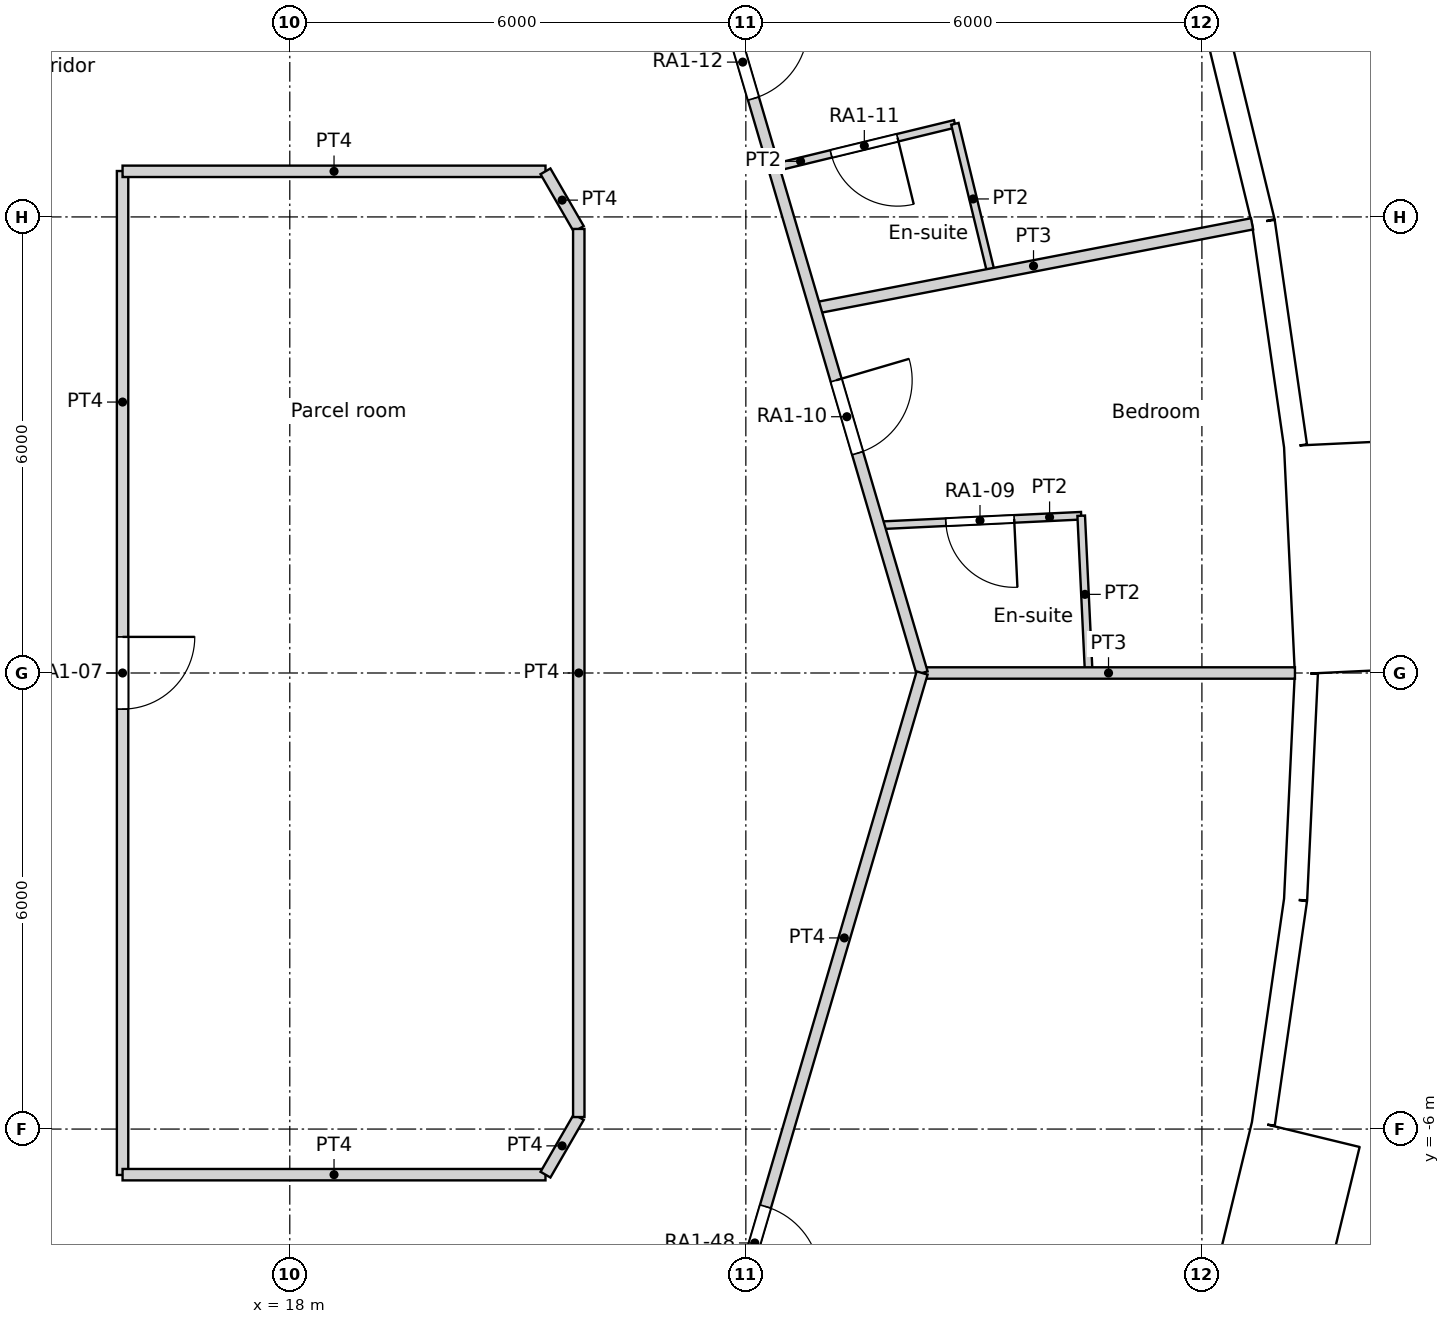
"""IFC4 building model, lengths in metres.
Left out: names, types, materials, properties, quantities, classifications, styles, units other than length and angle.
Written with IfcOpenShell. Run it as: python <this file> out.ifc"""

import sys

from ifc_helpers import new_model, si_unit, direction, frame, frame_2d, origin, origin_2d, place, context, subcontext, project, spatial, rectangle, circle, extrude, element, fill, save


model = new_model("IFC4")
c1 = context("Model", 3, precision=1e-05, world=origin(), true_north=direction((0.0, 1.0)))
c2 = subcontext(c1, "Body", "Model", "MODEL_VIEW")
j1 = project(units=[si_unit("LENGTHUNIT", "METRE"), si_unit("PLANEANGLEUNIT", "RADIAN")], contexts=[c1])
p1 = place(None, origin())
s1 = spatial("IfcSite", under=j1, at=p1, CompositionType="ELEMENT")
p2 = place(p1, origin())
s2 = spatial("IfcBuilding", under=s1, at=p2, CompositionType="ELEMENT")
p3 = place(p2, frame((0.0, 0.0, 28.2)))
s3 = spatial("IfcBuildingStorey", under=s2, at=p3, CompositionType="ELEMENT", Elevation=28.2)
for number, where, z_axis, x_axis in (
    (1, (30.275, 0.0, 0.0), (0.0, 0.0, 1.0), (1.0, 0.0, 0.0)),
    (2, (29.728, 5.729, 0.0), (0.0, 0.0, 1.0), (1.0, 0.0, 0.0)),
    (3, (29.728, -5.729, 0.0), (0.0, 0.0, 1.0), (1.0, 0.0, 0.0)),
):
    element("IfcColumn", number, at=place(p3, frame(where, z_axis=z_axis, x_axis=x_axis)), inside=s3, PredefinedType="COLUMN", context=c2, shape_type="SweptSolid", body=[
        extrude(circle(Radius=0.7, at=origin_2d()), origin(), (0.0, 0.0, 1.0), 3.6),
    ])
for number, where, z_axis, x_axis in (
    (4, (24.548, 0.0, 0.0), (0.0, 0.0, 1.0), (1.0, 0.0, 0.0)),
    (5, (23.886, 5.661, 0.0), (0.0, 0.0, 1.0), (1.0, 0.0, 0.0)),
    (6, (23.886, -5.661, 0.0), (0.0, 0.0, 1.0), (1.0, 0.0, 0.0)),
):
    element("IfcColumn", number, at=place(p3, frame(where, z_axis=z_axis, x_axis=x_axis)), inside=s3, PredefinedType="COLUMN", context=c2, shape_type="SweptSolid", body=[
        extrude(circle(Radius=0.75, at=origin_2d()), origin(), (0.0, 0.0, 1.0), 3.6),
    ])
for number, where, z_axis, x_axis in (
    (7, (18.822, 0.0, 0.0), (0.0, 0.0, 1.0), (1.0, 0.0, 0.0)),
    (8, (17.986, 5.548, 0.0), (0.0, 0.0, 1.0), (1.0, 0.0, 0.0)),
    (9, (17.986, -5.548, 0.0), (0.0, 0.0, 1.0), (1.0, 0.0, 0.0)),
):
    element("IfcColumn", number, at=place(p3, frame(where, z_axis=z_axis, x_axis=x_axis)), inside=s3, PredefinedType="COLUMN", context=c2, shape_type="SweptSolid", body=[
        extrude(circle(Radius=0.8, at=origin_2d()), origin(), (0.0, 0.0, 1.0), 3.6),
    ])
p4 = place(p3, frame((31.949, 0.02, -0.45), z_axis=(0.0, 0.0, 1.0), x_axis=(-0.047607680889, 0.998866111509, 0.0)))
e10 = element("IfcWall", 10, at=p4, inside=s3, PredefinedType="ELEMENTEDWALL", context=c2, shape_type="SweptSolid", body=[
    extrude(rectangle(XDim=3.0, YDim=1.45, at=frame_2d((1.5, 0.0))), origin(), (0.0, 0.0, 1.0), 3.6),
])
p5 = place(p4, frame((1.5, 0.0, 2.0)))
e11 = element("IfcOpeningElement", 11, at=p5, cuts=e10, PredefinedType="OPENING", context=c2, shape_type="SweptSolid", body=[
    extrude(circle(Radius=0.9, at=origin_2d()), frame((0.0, 0.735, 0.0), z_axis=(0.0, -1.0, 0.0), x_axis=(1.0, 0.0, 0.0)), (0.0, 0.0, 1.0), 1.47),
])
p6 = place(p3, frame((31.231, 2.988, 0.0), z_axis=(0.0, 0.0, 1.0), x_axis=(-0.142315996627, 0.989821275334, 0.0)))
e12 = element("IfcWall", 12, at=p6, inside=s3, PredefinedType="SOLIDWALL", context=c2, shape_type="SweptSolid", body=[
    extrude(rectangle(XDim=2.98, YDim=0.3, at=frame_2d((1.49, 0.0))), origin(), (0.0, 0.0, 1.0), 3.15),
])
p7 = place(p6, frame((1.49, 0.0, 1.55)))
e13 = element("IfcOpeningElement", 13, at=p7, cuts=e12, PredefinedType="OPENING", context=c2, shape_type="SweptSolid", body=[
    extrude(circle(Radius=0.9, at=origin_2d()), frame((0.0, 0.16, 0.0), z_axis=(0.0, -1.0, 0.0), x_axis=(1.0, 0.0, 0.0)), (0.0, 0.0, 1.0), 0.32),
])
p8 = place(p3, frame((30.807, 5.938, 0.0), z_axis=(0.0, 0.0, 1.0), x_axis=(-0.235743081534, 0.971815414319, 0.0)))
e14 = element("IfcWall", 14, at=p8, inside=s3, PredefinedType="SOLIDWALL", context=c2, shape_type="SweptSolid", body=[
    extrude(rectangle(XDim=2.979, YDim=0.3, at=frame_2d((1.49, 0.0))), origin(), (0.0, 0.0, 1.0), 3.15),
])
p9 = place(p8, frame((1.49, 0.0, 1.55)))
e15 = element("IfcOpeningElement", 15, at=p9, cuts=e14, PredefinedType="OPENING", context=c2, shape_type="SweptSolid", body=[
    extrude(circle(Radius=0.9, at=origin_2d()), frame((0.0, 0.16, 0.0), z_axis=(0.0, -1.0, 0.0), x_axis=(1.0, 0.0, 0.0)), (0.0, 0.0, 1.0), 0.32),
])
p10 = place(p3, frame((30.661, -8.982, -0.45), z_axis=(0.0, 0.0, 1.0), x_axis=(0.235751415068, 0.971813392732, 0.0)))
e16 = element("IfcWall", 16, at=p10, inside=s3, PredefinedType="ELEMENTEDWALL", context=c2, shape_type="SweptSolid", body=[
    extrude(rectangle(XDim=3.0, YDim=1.45, at=frame_2d((1.5, 0.0))), origin(), (0.0, 0.0, 1.0), 3.6),
])
p11 = place(p10, frame((1.5, 0.0, 2.0)))
e17 = element("IfcOpeningElement", 17, at=p11, cuts=e16, PredefinedType="OPENING", context=c2, shape_type="SweptSolid", body=[
    extrude(circle(Radius=0.9, at=origin_2d()), frame((0.0, 0.735, 0.0), z_axis=(0.0, -1.0, 0.0), x_axis=(1.0, 0.0, 0.0)), (0.0, 0.0, 1.0), 1.47),
])
p12 = place(p3, frame((30.808, -5.932, 0.0), z_axis=(0.0, 0.0, 1.0), x_axis=(0.142327539111, 0.989819615693, 0.0)))
e18 = element("IfcWall", 18, at=p12, inside=s3, PredefinedType="SOLIDWALL", context=c2, shape_type="SweptSolid", body=[
    extrude(rectangle(XDim=2.979, YDim=0.3, at=frame_2d((1.49, 0.0))), origin(), (0.0, 0.0, 1.0), 3.15),
])
p13 = place(p12, frame((1.49, 0.0, 1.55)))
e19 = element("IfcOpeningElement", 19, at=p13, cuts=e18, PredefinedType="OPENING", context=c2, shape_type="SweptSolid", body=[
    extrude(circle(Radius=0.9, at=origin_2d()), frame((0.0, 0.16, 0.0), z_axis=(0.0, -1.0, 0.0), x_axis=(1.0, 0.0, 0.0)), (0.0, 0.0, 1.0), 0.32),
])
p14 = place(p3, frame((31.232, -2.982, 0.0), z_axis=(0.0, 0.0, 1.0), x_axis=(0.047522328113, 0.998870175914, 0.0)))
e20 = element("IfcWall", 20, at=p14, inside=s3, PredefinedType="SOLIDWALL", context=c2, shape_type="SweptSolid", body=[
    extrude(rectangle(XDim=2.98, YDim=0.3, at=frame_2d((1.49, 0.0))), origin(), (0.0, 0.0, 1.0), 3.15),
])
p15 = place(p14, frame((1.49, 0.0, 1.55)))
e21 = element("IfcOpeningElement", 21, at=p15, cuts=e20, PredefinedType="OPENING", context=c2, shape_type="SweptSolid", body=[
    extrude(circle(Radius=0.9, at=origin_2d()), frame((0.0, 0.16, 0.0), z_axis=(0.0, -1.0, 0.0), x_axis=(1.0, 0.0, 0.0)), (0.0, 0.0, 1.0), 0.32),
])
p16 = place(p3, frame((15.8, -6.604, 0.0), z_axis=(0.0, 0.0, 1.0), x_axis=(0.0, 1.0, 0.0)))
e22 = element("IfcWall", 22, at=p16, inside=s3, PredefinedType="PARTITIONING", context=c2, shape_type="SweptSolid", body=[
    extrude(rectangle(XDim=13.208, YDim=0.15, at=frame_2d((6.604, 0.0))), origin(), (0.0, 0.0, 1.0), 3.15),
])
p17 = place(p16, frame((6.129, 0.0, 0.0)))
e23 = element("IfcOpeningElement", 23, at=p17, cuts=e22, PredefinedType="OPENING", context=c2, shape_type="SweptSolid", body=[
    extrude(rectangle(XDim=0.95, YDim=2.1, at=frame_2d((0.475, 1.05))), frame((0.0, 0.075, 0.0), z_axis=(0.0, -1.0, 0.0), x_axis=(1.0, 0.0, 0.0)), (0.0, 0.0, 1.0), 0.15),
])
p18 = place(p3, frame((15.8, -6.6, 0.0), z_axis=(0.0, 0.0, 1.0), x_axis=(1.0, 0.0, 0.0)))
e24 = element("IfcWall", 24, at=p18, inside=s3, PredefinedType="PARTITIONING", context=c2, shape_type="SweptSolid", body=[
    extrude(rectangle(XDim=5.564, YDim=0.15, at=frame_2d((2.782, 0.0))), origin(), (0.0, 0.0, 1.0), 3.15),
])
p19 = place(p3, frame((21.364, -6.6, 0.0), z_axis=(0.0, 0.0, 1.0), x_axis=(0.500277597875, 0.865865073245, 0.0)))
e25 = element("IfcWall", 25, at=p19, inside=s3, PredefinedType="PARTITIONING", context=c2, shape_type="SweptSolid", body=[
    extrude(rectangle(XDim=0.875, YDim=0.15, at=frame_2d((0.438, 0.0))), origin(), (0.0, 0.0, 1.0), 3.15),
])
p20 = place(p3, frame((21.802, -5.842, 0.0), z_axis=(0.0, 0.0, 1.0), x_axis=(0.0, 1.0, 0.0)))
e26 = element("IfcWall", 26, at=p20, inside=s3, PredefinedType="PARTITIONING", context=c2, shape_type="SweptSolid", body=[
    extrude(rectangle(XDim=11.684, YDim=0.15, at=frame_2d((5.842, 0.0))), origin(), (0.0, 0.0, 1.0), 3.15),
])
p21 = place(p3, frame((21.364, 6.6, 0.0), z_axis=(0.0, 0.0, 1.0), x_axis=(0.500277597875, -0.865865073245, 0.0)))
e27 = element("IfcWall", 27, at=p21, inside=s3, PredefinedType="PARTITIONING", context=c2, shape_type="SweptSolid", body=[
    extrude(rectangle(XDim=0.875, YDim=0.15, at=frame_2d((0.438, 0.0))), origin(), (0.0, 0.0, 1.0), 3.15),
])
p22 = place(p3, frame((15.8, 6.6, 0.0), z_axis=(0.0, 0.0, 1.0), x_axis=(1.0, 0.0, 0.0)))
e28 = element("IfcWall", 28, at=p22, inside=s3, PredefinedType="PARTITIONING", context=c2, shape_type="SweptSolid", body=[
    extrude(rectangle(XDim=5.564, YDim=0.15, at=frame_2d((2.782, 0.0))), origin(), (0.0, 0.0, 1.0), 3.15),
])
p23 = place(p3, frame((22.14, 14.229, 0.0), z_axis=(0.0, 0.0, 1.0), x_axis=(0.281780364869, -0.959478934617, 0.0)))
e29 = element("IfcWall", 29, at=p23, inside=s3, PredefinedType="PARTITIONING", context=c2, shape_type="SweptSolid", body=[
    extrude(rectangle(XDim=14.83, YDim=0.15, at=frame_2d((7.415, 0.0))), origin(), (0.0, 0.0, 1.0), 3.15),
])
p24 = place(p23, frame((10.816, 0.0, 0.0)))
e30 = element("IfcOpeningElement", 30, at=p24, cuts=e29, PredefinedType="OPENING", context=c2, shape_type="SweptSolid", body=[
    extrude(rectangle(XDim=1.0, YDim=2.1, at=frame_2d((0.5, 1.05))), frame((0.0, 0.075, 0.0), z_axis=(0.0, -1.0, 0.0), x_axis=(1.0, 0.0, 0.0)), (0.0, 0.0, 1.0), 0.15),
])
p25 = place(p23, frame((5.953, 0.0, 0.0)))
e31 = element("IfcOpeningElement", 31, at=p25, cuts=e29, PredefinedType="OPENING", context=c2, shape_type="SweptSolid", body=[
    extrude(rectangle(XDim=1.0, YDim=2.1, at=frame_2d((0.5, 1.05))), frame((0.0, 0.075, 0.0), z_axis=(0.0, -1.0, 0.0), x_axis=(1.0, 0.0, 0.0)), (0.0, 0.0, 1.0), 0.15),
])
p26 = place(p23, frame((1.033, 0.0, 0.0)))
e32 = element("IfcOpeningElement", 32, at=p26, cuts=e29, PredefinedType="OPENING", context=c2, shape_type="SweptSolid", body=[
    extrude(rectangle(XDim=1.0, YDim=2.1, at=frame_2d((0.5, 1.05))), frame((0.0, 0.075, 0.0), z_axis=(0.0, -1.0, 0.0), x_axis=(1.0, 0.0, 0.0)), (0.0, 0.0, 1.0), 0.15),
])
p27 = place(p3, frame((22.141, -14.229, 0.0), z_axis=(0.0, 0.0, 1.0), x_axis=(0.281730446162, 0.959493593363, 0.0)))
e33 = element("IfcWall", 33, at=p27, inside=s3, PredefinedType="PARTITIONING", context=c2, shape_type="SweptSolid", body=[
    extrude(rectangle(XDim=14.83, YDim=0.15, at=frame_2d((7.415, 0.0))), origin(), (0.0, 0.0, 1.0), 3.15),
])
p28 = place(p27, frame((6.515, 0.0, 0.0)))
e34 = element("IfcOpeningElement", 34, at=p28, cuts=e33, PredefinedType="OPENING", context=c2, shape_type="SweptSolid", body=[
    extrude(rectangle(XDim=1.0, YDim=2.04, at=frame_2d((0.5, 1.02))), frame((0.0, 0.075, 0.0), z_axis=(0.0, -1.0, 0.0), x_axis=(1.0, 0.0, 0.0)), (0.0, 0.0, 1.0), 0.15),
])
p29 = place(p3, frame((28.412, 2.069, 0.0), z_axis=(0.0, 0.0, 1.0), x_axis=(0.047733138673, -0.998860124078, 0.0)))
e35 = element("IfcWall", 35, at=p29, inside=s3, PredefinedType="PARTITIONING", context=c2, shape_type="SweptSolid", body=[
    extrude(rectangle(XDim=2.072, YDim=0.1, at=frame_2d((1.036, 0.0))), origin(), (0.0, 0.0, 1.0), 3.15),
])
p30 = place(p3, frame((25.749, 1.942, 0.0), z_axis=(0.0, 0.0, 1.0), x_axis=(0.998861290624, 0.047708721344, 0.0)))
e36 = element("IfcWall", 36, at=p30, inside=s3, PredefinedType="PARTITIONING", context=c2, shape_type="SweptSolid", body=[
    extrude(rectangle(XDim=2.666, YDim=0.1, at=frame_2d((1.333, 0.0))), origin(), (0.0, 0.0, 1.0), 3.15),
])
p31 = place(p30, frame((0.883, 0.0, 0.0)))
e37 = element("IfcOpeningElement", 37, at=p31, cuts=e36, PredefinedType="OPENING", context=c2, shape_type="SweptSolid", body=[
    extrude(rectangle(XDim=0.9, YDim=2.04, at=frame_2d((0.45, 1.02))), frame((0.0, 0.05, 0.0), z_axis=(0.0, -1.0, 0.0), x_axis=(1.0, 0.0, 0.0)), (0.0, 0.0, 1.0), 0.1),
])
p32 = place(p3, frame((24.909, 4.8, 0.0), z_axis=(0.0, 0.0, 1.0), x_axis=(0.981919819649, 0.18929729998, 0.0)))
e38 = element("IfcWall", 38, at=p32, inside=s3, PredefinedType="PARTITIONING", context=c2, shape_type="SweptSolid", body=[
    extrude(rectangle(XDim=5.857, YDim=0.15, at=frame_2d((2.928, 0.0))), origin(), (0.0, 0.0, 1.0), 3.15),
])
p33 = place(p3, frame((26.319, 0.0, 0.0), z_axis=(0.0, 0.0, 1.0), x_axis=(1.0, 0.0, 0.0)))
e39 = element("IfcWall", 39, at=p33, inside=s3, PredefinedType="PARTITIONING", context=c2, shape_type="SweptSolid", body=[
    extrude(rectangle(XDim=4.905, YDim=0.15, at=frame_2d((2.453, 0.0))), origin(), (0.0, 0.0, 1.0), 3.15),
])
p34 = place(p3, frame((26.75, 7.225, 0.0), z_axis=(0.0, 0.0, 1.0), x_axis=(0.23592286129, -0.97177178572, 0.0)))
e40 = element("IfcWall", 40, at=p34, inside=s3, PredefinedType="PARTITIONING", context=c2, shape_type="SweptSolid", body=[
    extrude(rectangle(XDim=2.034, YDim=0.1, at=frame_2d((1.017, 0.0))), origin(), (0.0, 0.0, 1.0), 3.15),
])
p35 = place(p3, frame((24.367, 6.646, 0.0), z_axis=(0.0, 0.0, 1.0), x_axis=(0.971720101056, 0.236135650006, 0.0)))
e41 = element("IfcWall", 41, at=p35, inside=s3, PredefinedType="PARTITIONING", context=c2, shape_type="SweptSolid", body=[
    extrude(rectangle(XDim=2.452, YDim=0.1, at=frame_2d((1.226, 0.0))), origin(), (0.0, 0.0, 1.0), 3.15),
])
p36 = place(p35, frame((0.776, 0.0, 0.0)))
e42 = element("IfcOpeningElement", 42, at=p36, cuts=e41, PredefinedType="OPENING", context=c2, shape_type="SweptSolid", body=[
    extrude(rectangle(XDim=0.9, YDim=2.04, at=frame_2d((0.45, 1.02))), frame((0.0, 0.05, 0.0), z_axis=(0.0, -1.0, 0.0), x_axis=(1.0, 0.0, 0.0)), (0.0, 0.0, 1.0), 0.1),
])
p37 = place(p5, origin())
e43 = element("IfcWindow", 43, at=p37, inside=s3, PartitioningType="SINGLE_PANEL", PredefinedType="WINDOW", context=c2, shape_type="SweptSolid", body=[
    extrude(circle(Radius=0.9, at=origin_2d()), frame((0.0, 0.695, 0.0), z_axis=(0.0, -1.0, 0.0), x_axis=(1.0, 0.0, 0.0)), (0.0, 0.0, 1.0), 0.1),
])
fill(e11, e43)
p38 = place(p7, origin())
e44 = element("IfcWindow", 44, at=p38, inside=s3, PartitioningType="SINGLE_PANEL", PredefinedType="WINDOW", context=c2, shape_type="SweptSolid", body=[
    extrude(circle(Radius=0.9, at=origin_2d()), frame((0.0, 0.12, 0.0), z_axis=(0.0, -1.0, 0.0), x_axis=(1.0, 0.0, 0.0)), (0.0, 0.0, 1.0), 0.1),
])
fill(e13, e44)
p39 = place(p9, origin())
e45 = element("IfcWindow", 45, at=p39, inside=s3, PartitioningType="SINGLE_PANEL", PredefinedType="WINDOW", context=c2, shape_type="SweptSolid", body=[
    extrude(circle(Radius=0.9, at=origin_2d()), frame((0.0, 0.12, 0.0), z_axis=(0.0, -1.0, 0.0), x_axis=(1.0, 0.0, 0.0)), (0.0, 0.0, 1.0), 0.1),
])
fill(e15, e45)
p40 = place(p11, origin())
e46 = element("IfcWindow", 46, at=p40, inside=s3, PartitioningType="SINGLE_PANEL", PredefinedType="WINDOW", context=c2, shape_type="SweptSolid", body=[
    extrude(circle(Radius=0.9, at=origin_2d()), frame((0.0, 0.695, 0.0), z_axis=(0.0, -1.0, 0.0), x_axis=(1.0, 0.0, 0.0)), (0.0, 0.0, 1.0), 0.1),
])
fill(e17, e46)
p41 = place(p13, origin())
e47 = element("IfcWindow", 47, at=p41, inside=s3, PartitioningType="SINGLE_PANEL", PredefinedType="WINDOW", context=c2, shape_type="SweptSolid", body=[
    extrude(circle(Radius=0.9, at=origin_2d()), frame((0.0, 0.12, 0.0), z_axis=(0.0, -1.0, 0.0), x_axis=(1.0, 0.0, 0.0)), (0.0, 0.0, 1.0), 0.1),
])
fill(e19, e47)
p42 = place(p15, origin())
e48 = element("IfcWindow", 48, at=p42, inside=s3, PartitioningType="SINGLE_PANEL", PredefinedType="WINDOW", context=c2, shape_type="SweptSolid", body=[
    extrude(circle(Radius=0.9, at=origin_2d()), frame((0.0, 0.12, 0.0), z_axis=(0.0, -1.0, 0.0), x_axis=(1.0, 0.0, 0.0)), (0.0, 0.0, 1.0), 0.1),
])
fill(e21, e48)
p43 = place(p17, origin())
e49 = element("IfcDoor", 49, at=p43, inside=s3, OperationType="SINGLE_SWING_LEFT", PredefinedType="DOOR", context=c2, shape_type="SweptSolid", body=[
    extrude(rectangle(XDim=0.95, YDim=2.1, at=frame_2d((0.475, 1.05))), frame((0.0, 0.025, 0.0), z_axis=(0.0, -1.0, 0.0), x_axis=(1.0, 0.0, 0.0)), (0.0, 0.0, 1.0), 0.05),
])
fill(e23, e49)
p44 = place(p31, origin())
e50 = element("IfcDoor", 50, at=p44, inside=s3, OperationType="SINGLE_SWING_LEFT", PredefinedType="DOOR", context=c2, shape_type="SweptSolid", body=[
    extrude(rectangle(XDim=0.9, YDim=2.04, at=frame_2d((0.45, 1.02))), frame((0.0, 0.025, 0.0), z_axis=(0.0, -1.0, 0.0), x_axis=(1.0, 0.0, 0.0)), (0.0, 0.0, 1.0), 0.05),
])
fill(e37, e50)
p45 = place(p24, origin())
e51 = element("IfcDoor", 51, at=p45, inside=s3, OperationType="SINGLE_SWING_LEFT", PredefinedType="DOOR", context=c2, shape_type="SweptSolid", body=[
    extrude(rectangle(XDim=1.0, YDim=2.1, at=frame_2d((0.5, 1.05))), frame((0.0, 0.025, 0.0), z_axis=(0.0, -1.0, 0.0), x_axis=(1.0, 0.0, 0.0)), (0.0, 0.0, 1.0), 0.05),
])
fill(e30, e51)
p46 = place(p36, origin())
e52 = element("IfcDoor", 52, at=p46, inside=s3, OperationType="SINGLE_SWING_LEFT", PredefinedType="DOOR", context=c2, shape_type="SweptSolid", body=[
    extrude(rectangle(XDim=0.9, YDim=2.04, at=frame_2d((0.45, 1.02))), frame((0.0, 0.025, 0.0), z_axis=(0.0, -1.0, 0.0), x_axis=(1.0, 0.0, 0.0)), (0.0, 0.0, 1.0), 0.05),
])
fill(e42, e52)
p47 = place(p25, origin())
e53 = element("IfcDoor", 53, at=p47, inside=s3, OperationType="SINGLE_SWING_LEFT", PredefinedType="DOOR", context=c2, shape_type="SweptSolid", body=[
    extrude(rectangle(XDim=1.0, YDim=2.1, at=frame_2d((0.5, 1.05))), frame((0.0, 0.025, 0.0), z_axis=(0.0, -1.0, 0.0), x_axis=(1.0, 0.0, 0.0)), (0.0, 0.0, 1.0), 0.05),
])
fill(e31, e53)
p48 = place(p28, origin())
e54 = element("IfcDoor", 54, at=p48, inside=s3, OperationType="SINGLE_SWING_RIGHT", PredefinedType="DOOR", context=c2, shape_type="SweptSolid", body=[
    extrude(rectangle(XDim=1.0, YDim=2.04, at=frame_2d((0.5, 1.02))), frame((0.0, 0.025, 0.0), z_axis=(0.0, -1.0, 0.0), x_axis=(1.0, 0.0, 0.0)), (0.0, 0.0, 1.0), 0.05),
])
fill(e34, e54)
save(model, sys.argv[1])
